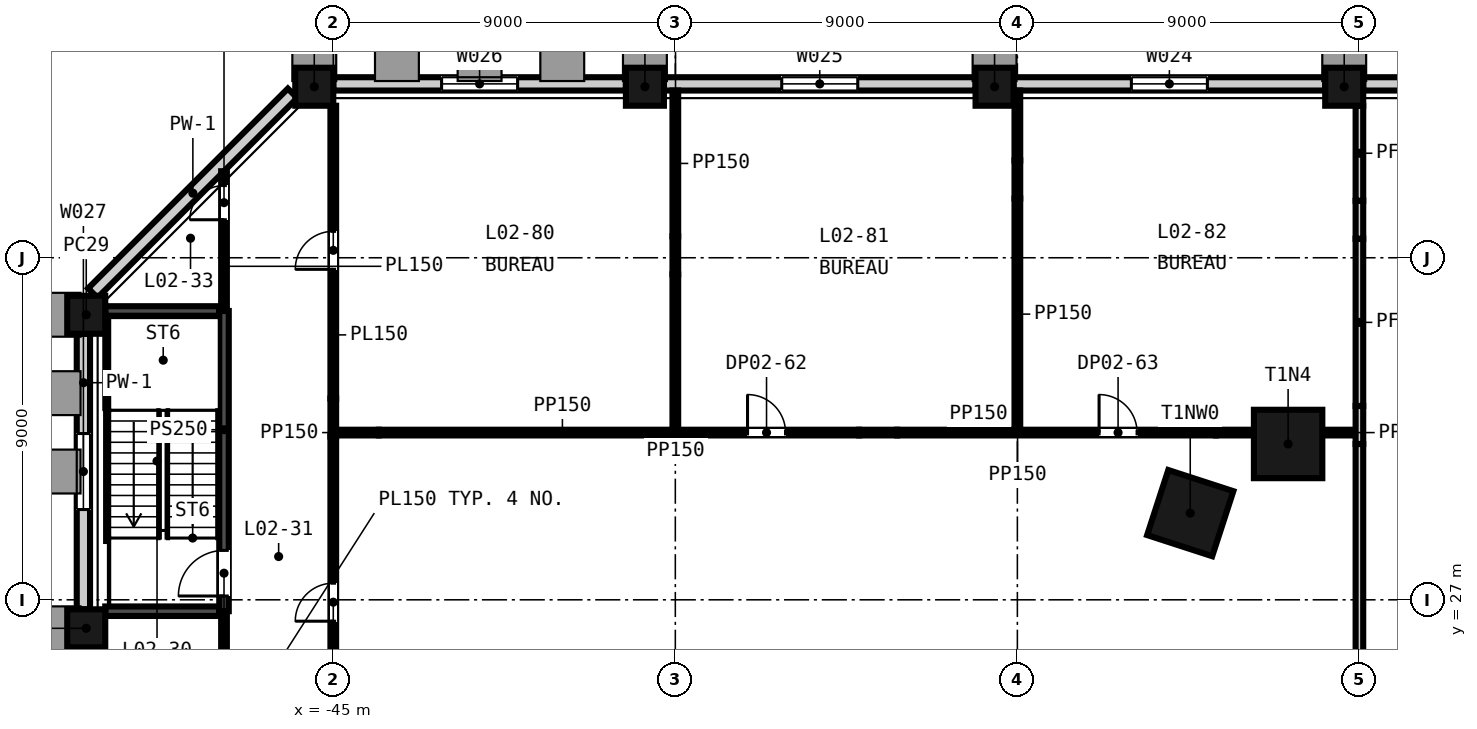
"""IFC4 building model, lengths in metres.
Left out: names, types, materials, properties, quantities, classifications, styles, units other than length and angle.
Written with IfcOpenShell. Run it as: python <this file> out.ifc"""

import sys

from ifc_helpers import new_model, si_unit, direction, frame, frame_2d, origin, origin_2d, place, context, subcontext, project, spatial, rectangle, extrude, element, fill, save


model = new_model("IFC4")
c1 = context("Model", 3, precision=1e-05, world=origin(), true_north=direction((0.0, 1.0)))
c2 = subcontext(c1, "Body", "Model", "MODEL_VIEW")
j1 = project(units=[si_unit("LENGTHUNIT", "METRE"), si_unit("PLANEANGLEUNIT", "RADIAN")], contexts=[c1])
p1 = place(None, origin())
s1 = spatial("IfcSite", under=j1, at=p1, CompositionType="ELEMENT")
p2 = place(p1, origin())
s2 = spatial("IfcBuilding", under=s1, at=p2, CompositionType="ELEMENT")
p3 = place(p2, frame((0.0, 0.0, 18.0)))
s3 = spatial("IfcBuildingStorey", under=s2, at=p3, CompositionType="ELEMENT", Elevation=18.0)
for number, where, z_axis, x_axis in (
    (1, (-19.876, 31.1, -0.4), (0.0, 0.0, 1.0), (-1.0, 0.0, 0.0)),
    (2, (-22.451, 29.281, -0.4), (0.0, 0.0, 1.0), (-0.309, -0.951, 0.0)),
):
    element("IfcColumn", number, at=place(p3, frame(where, z_axis=z_axis, x_axis=x_axis)), inside=s3, PredefinedType="COLUMN", context=c2, shape_type="SweptSolid", body=[
        extrude(rectangle(XDim=1.8, YDim=1.8, at=origin_2d()), origin(), (0.0, 0.0, 1.0), 4.6),
    ])
for number, where, z_axis, x_axis in (
    (3, (-18.4, 40.5, -0.4), (0.0, 0.0, 1.0), (-1.0, 0.0, 0.0)),
    (4, (-27.6, 40.5, -0.4), (0.0, 0.0, 1.0), (-1.0, 0.0, 0.0)),
    (5, (-36.8, 40.5, -0.4), (0.0, 0.0, 1.0), (-1.0, 0.0, 0.0)),
    (6, (-45.5, 40.5, -0.4), (0.0, 0.0, 1.0), (-1.0, 0.0, 0.0)),
    (7, (-51.5, 34.5, -0.4), (0.0, 0.0, 1.0), (0.0, -1.0, 0.0)),
    (8, (-51.5, 26.25, -0.4), (0.0, 0.0, 1.0), (0.0, -1.0, 0.0)),
):
    element("IfcColumn", number, at=place(p3, frame(where, z_axis=z_axis, x_axis=x_axis)), inside=s3, PredefinedType="COLUMN", context=c2, shape_type="SweptSolid", body=[
        extrude(rectangle(XDim=1.0, YDim=1.0, at=origin_2d()), origin(), (0.0, 0.0, 1.0), 4.6),
    ])
p4 = place(p3, frame((-9.7, 40.575, -0.4), z_axis=(0.0, 0.0, 1.0), x_axis=(-1.0, 0.0, 0.0)))
e9 = element("IfcWall", 9, at=p4, inside=s3, PredefinedType="SOLIDWALL", context=c2, shape_type="SweptSolid", body=[
    extrude(rectangle(XDim=8.2, YDim=0.35, at=frame_2d((4.1, 0.0))), origin(), (0.0, 0.0, 1.0), 3.7),
])
p5 = place(p4, frame((3.1, 0.0, 1.3)))
e10 = element("IfcOpeningElement", 10, at=p5, cuts=e9, PredefinedType="OPENING", context=c2, shape_type="SweptSolid", body=[
    extrude(rectangle(XDim=2.0, YDim=2.35, at=frame_2d((1.0, 1.175))), frame((0.0, 0.185, 0.0), z_axis=(0.0, -1.0, 0.0), x_axis=(1.0, 0.0, 0.0)), (0.0, 0.0, 1.0), 0.37),
])
p6 = place(p3, frame((-18.9, 40.575, -0.4), z_axis=(0.0, 0.0, 1.0), x_axis=(-1.0, 0.0, 0.0)))
e11 = element("IfcWall", 11, at=p6, inside=s3, PredefinedType="SOLIDWALL", context=c2, shape_type="SweptSolid", body=[
    extrude(rectangle(XDim=8.2, YDim=0.35, at=frame_2d((4.1, 0.0))), origin(), (0.0, 0.0, 1.0), 3.7),
])
p7 = place(p6, frame((3.1, 0.0, 1.3)))
e12 = element("IfcOpeningElement", 12, at=p7, cuts=e11, PredefinedType="OPENING", context=c2, shape_type="SweptSolid", body=[
    extrude(rectangle(XDim=2.0, YDim=2.35, at=frame_2d((1.0, 1.175))), frame((0.0, 0.185, 0.0), z_axis=(0.0, -1.0, 0.0), x_axis=(1.0, 0.0, 0.0)), (0.0, 0.0, 1.0), 0.37),
])
p8 = place(p3, frame((-28.1, 40.575, -0.4), z_axis=(0.0, 0.0, 1.0), x_axis=(-1.0, 0.0, 0.0)))
e13 = element("IfcWall", 13, at=p8, inside=s3, PredefinedType="SOLIDWALL", context=c2, shape_type="SweptSolid", body=[
    extrude(rectangle(XDim=8.2, YDim=0.35, at=frame_2d((4.1, 0.0))), origin(), (0.0, 0.0, 1.0), 3.7),
])
p9 = place(p8, frame((3.1, 0.0, 1.3)))
e14 = element("IfcOpeningElement", 14, at=p9, cuts=e13, PredefinedType="OPENING", context=c2, shape_type="SweptSolid", body=[
    extrude(rectangle(XDim=2.0, YDim=2.35, at=frame_2d((1.0, 1.175))), frame((0.0, 0.185, 0.0), z_axis=(0.0, -1.0, 0.0), x_axis=(1.0, 0.0, 0.0)), (0.0, 0.0, 1.0), 0.37),
])
p10 = place(p3, frame((-37.3, 40.575, -0.4), z_axis=(0.0, 0.0, 1.0), x_axis=(-1.0, 0.0, 0.0)))
e15 = element("IfcWall", 15, at=p10, inside=s3, PredefinedType="SOLIDWALL", context=c2, shape_type="SweptSolid", body=[
    extrude(rectangle(XDim=7.7, YDim=0.35, at=frame_2d((3.85, 0.0))), origin(), (0.0, 0.0, 1.0), 3.7),
])
p11 = place(p10, frame((2.85, 0.0, 1.3)))
e16 = element("IfcOpeningElement", 16, at=p11, cuts=e15, PredefinedType="OPENING", context=c2, shape_type="SweptSolid", body=[
    extrude(rectangle(XDim=2.0, YDim=2.35, at=frame_2d((1.0, 1.175))), frame((0.0, 0.185, 0.0), z_axis=(0.0, -1.0, 0.0), x_axis=(1.0, 0.0, 0.0)), (0.0, 0.0, 1.0), 0.37),
])
p12 = place(p3, frame((-46.072, 40.327, -0.4), z_axis=(0.0, 0.0, 1.0), x_axis=(-0.707106781187, -0.707106781187, 0.0)))
e17 = element("IfcWall", 17, at=p12, inside=s3, PredefinedType="SOLIDWALL", context=c2, shape_type="SweptSolid", body=[
    extrude(rectangle(XDim=7.433, YDim=0.35, at=frame_2d((3.716, 0.0))), origin(), (0.0, 0.0, 1.0), 3.7),
])
p13 = place(p3, frame((-51.575, 34.0, -0.4), z_axis=(0.0, 0.0, 1.0), x_axis=(0.0, -1.0, 0.0)))
e18 = element("IfcWall", 18, at=p13, inside=s3, PredefinedType="SOLIDWALL", context=c2, shape_type="SweptSolid", body=[
    extrude(rectangle(XDim=7.25, YDim=0.35, at=frame_2d((3.625, 0.0))), origin(), (0.0, 0.0, 1.0), 3.7),
])
p14 = place(p13, frame((2.625, 0.0, 1.3)))
e19 = element("IfcOpeningElement", 19, at=p14, cuts=e18, PredefinedType="OPENING", context=c2, shape_type="SweptSolid", body=[
    extrude(rectangle(XDim=2.0, YDim=2.35, at=frame_2d((1.0, 1.175))), frame((0.0, 0.185, 0.0), z_axis=(0.0, -1.0, 0.0), x_axis=(1.0, 0.0, 0.0)), (0.0, 0.0, 1.0), 0.37),
])
p15 = place(p3, frame((-51.575, 25.75, -0.4), z_axis=(0.0, 0.0, 1.0), x_axis=(0.0, -1.0, 0.0)))
e20 = element("IfcWall", 20, at=p15, inside=s3, PredefinedType="SOLIDWALL", context=c2, shape_type="SweptSolid", body=[
    extrude(rectangle(XDim=7.75, YDim=0.35, at=frame_2d((3.875, 0.0))), origin(), (0.0, 0.0, 1.0), 3.7),
])
p16 = place(p15, frame((2.875, 0.0, 1.3)))
e21 = element("IfcOpeningElement", 21, at=p16, cuts=e20, PredefinedType="OPENING", context=c2, shape_type="SweptSolid", body=[
    extrude(rectangle(XDim=2.0, YDim=2.35, at=frame_2d((1.0, 1.175))), frame((0.0, 0.185, 0.0), z_axis=(0.0, -1.0, 0.0), x_axis=(1.0, 0.0, 0.0)), (0.0, 0.0, 1.0), 0.37),
])
p17 = place(p3, frame((-51.0, 26.7, 0.0), z_axis=(0.0, 0.0, 1.0), x_axis=(1.0, 0.0, 0.0)))
e22 = element("IfcWall", 22, at=p17, inside=s3, PredefinedType="SHEAR", context=c2, shape_type="SweptSolid", body=[
    extrude(rectangle(XDim=3.0, YDim=0.25, at=frame_2d((1.5, 0.0))), origin(), (0.0, 0.0, 1.0), 4.2),
])
p18 = place(p3, frame((-44.925, 31.4, 0.0), z_axis=(0.0, 0.0, 1.0), x_axis=(1.0, 0.0, 0.0)))
e23 = element("IfcWall", 23, at=p18, inside=s3, PredefinedType="PARTITIONING", context=c2, shape_type="SweptSolid", body=[
    extrude(rectangle(XDim=1.123, YDim=0.15, at=frame_2d((0.562, 0.0))), origin(), (0.0, 0.0, 1.0), 3.111),
])
p19 = place(p3, frame((-43.802, 31.4, 0.0), z_axis=(0.0, 0.0, 1.0), x_axis=(1.0, 0.0, 0.0)))
e24 = element("IfcWall", 24, at=p19, inside=s3, PredefinedType="PARTITIONING", context=c2, shape_type="SweptSolid", body=[
    extrude(rectangle(XDim=12.64, YDim=0.15, at=frame_2d((6.32, 0.0))), origin(), (0.0, 0.0, 1.0), 4.2),
])
p20 = place(p19, frame((9.702, 0.0, 0.0)))
e25 = element("IfcOpeningElement", 25, at=p20, cuts=e24, PredefinedType="OPENING", context=c2, shape_type="SweptSolid", body=[
    extrude(rectangle(XDim=1.0, YDim=2.1, at=frame_2d((0.5, 1.05))), frame((0.0, 0.085, 0.0), z_axis=(0.0, -1.0, 0.0), x_axis=(1.0, 0.0, 0.0)), (0.0, 0.0, 1.0), 0.17),
])
p21 = place(p3, frame((-31.162, 31.4, 0.0), z_axis=(0.0, 0.0, 1.0), x_axis=(1.0, 0.0, 0.0)))
e26 = element("IfcWall", 26, at=p21, inside=s3, PredefinedType="PARTITIONING", context=c2, shape_type="SweptSolid", body=[
    extrude(rectangle(XDim=1.0, YDim=0.15, at=frame_2d((0.5, 0.0))), origin(), (0.0, 0.0, 1.0), 3.219),
])
p22 = place(p3, frame((-30.162, 31.4, 0.0), z_axis=(0.0, 0.0, 1.0), x_axis=(1.0, 0.0, 0.0)))
e27 = element("IfcWall", 27, at=p22, inside=s3, PredefinedType="PARTITIONING", context=c2, shape_type="SweptSolid", body=[
    extrude(rectangle(XDim=8.386, YDim=0.15, at=frame_2d((4.193, 0.0))), origin(), (0.0, 0.0, 1.0), 4.2),
])
p23 = place(p22, frame((5.312, 0.0, 0.0)))
e28 = element("IfcOpeningElement", 28, at=p23, cuts=e27, PredefinedType="OPENING", context=c2, shape_type="SweptSolid", body=[
    extrude(rectangle(XDim=1.0, YDim=2.1, at=frame_2d((0.5, 1.05))), frame((0.0, 0.085, 0.0), z_axis=(0.0, -1.0, 0.0), x_axis=(1.0, 0.0, 0.0)), (0.0, 0.0, 1.0), 0.17),
])
p24 = place(p3, frame((-21.776, 31.4, 0.0), z_axis=(0.0, 0.0, 1.0), x_axis=(1.0, 0.0, 0.0)))
e29 = element("IfcWall", 29, at=p24, inside=s3, PredefinedType="PARTITIONING", context=c2, shape_type="SweptSolid", body=[
    extrude(rectangle(XDim=1.0, YDim=0.15, at=frame_2d((0.5, 0.0))), origin(), (0.0, 0.0, 1.0), 3.2),
])
p25 = place(p3, frame((-18.976, 31.4, 0.0), z_axis=(0.0, 0.0, 1.0), x_axis=(1.0, 0.0, 0.0)))
e30 = element("IfcWall", 30, at=p25, inside=s3, PredefinedType="PARTITIONING", context=c2, shape_type="SweptSolid", body=[
    extrude(rectangle(XDim=0.876, YDim=0.15, at=frame_2d((0.438, 0.0))), origin(), (0.0, 0.0, 1.0), 3.2),
])
p26 = place(p3, frame((-51.0, 34.6, 0.0), z_axis=(0.0, 0.0, 1.0), x_axis=(1.0, 0.0, 0.0)))
e31 = element("IfcWall", 31, at=p26, inside=s3, PredefinedType="SHEAR", context=c2, shape_type="SweptSolid", body=[
    extrude(rectangle(XDim=3.0, YDim=0.25, at=frame_2d((1.5, 0.0))), origin(), (0.0, 0.0, 1.0), 4.2),
])
p27 = place(p3, frame((-47.875, 23.616, 0.0), z_axis=(0.0, 0.0, 1.0), x_axis=(0.0, 1.0, 0.0)))
e32 = element("IfcWall", 32, at=p27, inside=s3, PredefinedType="PARTITIONING", context=c2, shape_type="SweptSolid", body=[
    extrude(rectangle(XDim=3.084, YDim=0.15, at=frame_2d((1.542, 0.0))), origin(), (0.0, 0.0, 1.0), 4.2),
])
p28 = place(p3, frame((-47.875, 26.7, 0.0), z_axis=(0.0, 0.0, 1.0), x_axis=(0.0, 1.0, 0.0)))
e33 = element("IfcWall", 33, at=p28, inside=s3, PredefinedType="SHEAR", context=c2, shape_type="SweptSolid", body=[
    extrude(rectangle(XDim=7.9, YDim=0.25, at=frame_2d((3.95, 0.0))), origin(), (0.0, 0.0, 1.0), 4.2),
])
p29 = place(p28, frame((0.4, 0.0, 0.0)))
e34 = element("IfcOpeningElement", 34, at=p29, cuts=e33, PredefinedType="OPENING", context=c2, shape_type="SweptSolid", body=[
    extrude(rectangle(XDim=1.2, YDim=2.1, at=frame_2d((0.6, 1.05))), frame((0.0, 0.135, 0.0), z_axis=(0.0, -1.0, 0.0), x_axis=(1.0, 0.0, 0.0)), (0.0, 0.0, 1.0), 0.27),
])
p30 = place(p3, frame((-47.875, 34.6, 0.0), z_axis=(0.0, 0.0, 1.0), x_axis=(0.0, 1.0, 0.0)))
e35 = element("IfcWall", 35, at=p30, inside=s3, PredefinedType="PARTITIONING", context=c2, shape_type="SweptSolid", body=[
    extrude(rectangle(XDim=3.677, YDim=0.15, at=frame_2d((1.838, 0.0))), origin(), (0.0, 0.0, 1.0), 3.667),
])
p31 = place(p30, frame((2.4, 0.0, 0.0)))
e36 = element("IfcOpeningElement", 36, at=p31, cuts=e35, PredefinedType="OPENING", context=c2, shape_type="SweptSolid", body=[
    extrude(rectangle(XDim=0.9, YDim=2.1, at=frame_2d((0.45, 1.05))), frame((0.0, 0.085, 0.0), z_axis=(0.0, -1.0, 0.0), x_axis=(1.0, 0.0, 0.0)), (0.0, 0.0, 1.0), 0.17),
])
p32 = place(p3, frame((-45.0, 22.537, 0.0), z_axis=(0.0, 0.0, 1.0), x_axis=(0.0, 1.0, 0.0)))
e37 = element("IfcWall", 37, at=p32, inside=s3, PredefinedType="PARTITIONING", context=c2, shape_type="SweptSolid", body=[
    extrude(rectangle(XDim=8.758, YDim=0.15, at=frame_2d((4.379, 0.0))), origin(), (0.0, 0.0, 1.0), 4.2),
])
p33 = place(p32, frame((3.9, 0.0, 0.0)))
e38 = element("IfcOpeningElement", 38, at=p33, cuts=e37, PredefinedType="OPENING", context=c2, shape_type="SweptSolid", body=[
    extrude(rectangle(XDim=1.0, YDim=2.1, at=frame_2d((0.5, 1.05))), frame((0.0, 0.085, 0.0), z_axis=(0.0, -1.0, 0.0), x_axis=(1.0, 0.0, 0.0)), (0.0, 0.0, 1.0), 0.17),
])
p34 = place(p3, frame((-45.0, 31.295, 0.0), z_axis=(0.0, 0.0, 1.0), x_axis=(0.0, 1.0, 0.0)))
e39 = element("IfcWall", 39, at=p34, inside=s3, PredefinedType="PARTITIONING", context=c2, shape_type="SweptSolid", body=[
    extrude(rectangle(XDim=1.0, YDim=0.15, at=frame_2d((0.5, 0.0))), origin(), (0.0, 0.0, 1.0), 3.111),
])
p35 = place(p3, frame((-45.0, 32.295, 0.0), z_axis=(0.0, 0.0, 1.0), x_axis=(0.0, 1.0, 0.0)))
e40 = element("IfcWall", 40, at=p35, inside=s3, PredefinedType="PARTITIONING", context=c2, shape_type="SweptSolid", body=[
    extrude(rectangle(XDim=7.705, YDim=0.15, at=frame_2d((3.852, 0.0))), origin(), (0.0, 0.0, 1.0), 4.2),
])
p36 = place(p35, frame((3.4, 0.0, 0.0)))
e41 = element("IfcOpeningElement", 41, at=p36, cuts=e40, PredefinedType="OPENING", context=c2, shape_type="SweptSolid", body=[
    extrude(rectangle(XDim=1.0, YDim=2.1, at=frame_2d((0.5, 1.05))), frame((0.0, 0.085, 0.0), z_axis=(0.0, -1.0, 0.0), x_axis=(1.0, 0.0, 0.0)), (0.0, 0.0, 1.0), 0.17),
])
p37 = place(p3, frame((-36.0, 31.475, 0.0), z_axis=(0.0, 0.0, 1.0), x_axis=(0.0, 1.0, 0.0)))
e42 = element("IfcWall", 42, at=p37, inside=s3, PredefinedType="PARTITIONING", context=c2, shape_type="SweptSolid", body=[
    extrude(rectangle(XDim=4.089, YDim=0.15, at=frame_2d((2.044, 0.0))), origin(), (0.0, 0.0, 1.0), 4.2),
])
p38 = place(p3, frame((-36.0, 35.564, 0.0), z_axis=(0.0, 0.0, 1.0), x_axis=(0.0, 1.0, 0.0)))
e43 = element("IfcWall", 43, at=p38, inside=s3, PredefinedType="PARTITIONING", context=c2, shape_type="SweptSolid", body=[
    extrude(rectangle(XDim=1.0, YDim=0.15, at=frame_2d((0.5, 0.0))), origin(), (0.0, 0.0, 1.0), 3.219),
])
p39 = place(p3, frame((-36.0, 36.564, 0.0), z_axis=(0.0, 0.0, 1.0), x_axis=(0.0, 1.0, 0.0)))
e44 = element("IfcWall", 44, at=p39, inside=s3, PredefinedType="PARTITIONING", context=c2, shape_type="SweptSolid", body=[
    extrude(rectangle(XDim=3.836, YDim=0.15, at=frame_2d((1.918, 0.0))), origin(), (0.0, 0.0, 1.0), 4.2),
])
p40 = place(p3, frame((-27.0, 31.475, 0.0), z_axis=(0.0, 0.0, 1.0), x_axis=(0.0, 1.0, 0.0)))
e45 = element("IfcWall", 45, at=p40, inside=s3, PredefinedType="PARTITIONING", context=c2, shape_type="SweptSolid", body=[
    extrude(rectangle(XDim=6.083, YDim=0.15, at=frame_2d((3.042, 0.0))), origin(), (0.0, 0.0, 1.0), 4.2),
])
p41 = place(p3, frame((-27.0, 37.559, 0.0), z_axis=(0.0, 0.0, 1.0), x_axis=(0.0, 1.0, 0.0)))
e46 = element("IfcWall", 46, at=p41, inside=s3, PredefinedType="PARTITIONING", context=c2, shape_type="SweptSolid", body=[
    extrude(rectangle(XDim=1.0, YDim=0.15, at=frame_2d((0.5, 0.0))), origin(), (0.0, 0.0, 1.0), 3.521),
])
p42 = place(p3, frame((-27.0, 38.559, 0.0), z_axis=(0.0, 0.0, 1.0), x_axis=(0.0, 1.0, 0.0)))
e47 = element("IfcWall", 47, at=p42, inside=s3, PredefinedType="PARTITIONING", context=c2, shape_type="SweptSolid", body=[
    extrude(rectangle(XDim=1.841, YDim=0.15, at=frame_2d((0.921, 0.0))), origin(), (0.0, 0.0, 1.0), 4.2),
])
p43 = place(p3, frame((-18.0, 18.0, 0.0), z_axis=(0.0, 0.0, 1.0), x_axis=(0.0, 1.0, 0.0)))
e48 = element("IfcWall", 48, at=p43, inside=s3, PredefinedType="PARTITIONING", context=c2, shape_type="SweptSolid", body=[
    extrude(rectangle(XDim=13.1, YDim=0.2, at=frame_2d((6.55, 0.0))), origin(), (0.0, 0.0, 1.0), 4.2),
])
p44 = place(p3, frame((-18.0, 31.1, 0.0), z_axis=(0.0, 0.0, 1.0), x_axis=(0.0, 1.0, 0.0)))
e49 = element("IfcWall", 49, at=p44, inside=s3, PredefinedType="PARTITIONING", context=c2, shape_type="SweptSolid", body=[
    extrude(rectangle(XDim=1.0, YDim=0.2, at=frame_2d((0.5, 0.0))), origin(), (0.0, 0.0, 1.0), 3.2),
])
p45 = place(p3, frame((-18.0, 32.1, 0.0), z_axis=(0.0, 0.0, 1.0), x_axis=(0.0, 1.0, 0.0)))
e50 = element("IfcWall", 50, at=p45, inside=s3, PredefinedType="PARTITIONING", context=c2, shape_type="SweptSolid", body=[
    extrude(rectangle(XDim=4.4, YDim=0.2, at=frame_2d((2.2, 0.0))), origin(), (0.0, 0.0, 1.0), 4.2),
])
p46 = place(p3, frame((-18.0, 36.5, 0.0), z_axis=(0.0, 0.0, 1.0), x_axis=(0.0, 1.0, 0.0)))
e51 = element("IfcWall", 51, at=p46, inside=s3, PredefinedType="PARTITIONING", context=c2, shape_type="SweptSolid", body=[
    extrude(rectangle(XDim=1.0, YDim=0.2, at=frame_2d((0.5, 0.0))), origin(), (0.0, 0.0, 1.0), 3.597),
])
p47 = place(p3, frame((-18.0, 37.5, 0.0), z_axis=(0.0, 0.0, 1.0), x_axis=(0.0, 1.0, 0.0)))
e52 = element("IfcWall", 52, at=p47, inside=s3, PredefinedType="PARTITIONING", context=c2, shape_type="SweptSolid", body=[
    extrude(rectangle(XDim=2.5, YDim=0.2, at=frame_2d((1.25, 0.0))), origin(), (0.0, 0.0, 1.0), 4.2),
])
p48 = place(p7, origin())
e53 = element("IfcWindow", 53, at=p48, inside=s3, PartitioningType="SINGLE_PANEL", PredefinedType="WINDOW", context=c2, shape_type="SweptSolid", body=[
    extrude(rectangle(XDim=2.0, YDim=2.35, at=frame_2d((1.0, 1.175))), frame((0.0, 0.03, 0.0), z_axis=(0.0, -1.0, 0.0), x_axis=(1.0, 0.0, 0.0)), (0.0, 0.0, 1.0), 0.06),
])
fill(e12, e53)
p49 = place(p9, origin())
e54 = element("IfcWindow", 54, at=p49, inside=s3, PartitioningType="SINGLE_PANEL", PredefinedType="WINDOW", context=c2, shape_type="SweptSolid", body=[
    extrude(rectangle(XDim=2.0, YDim=2.35, at=frame_2d((1.0, 1.175))), frame((0.0, 0.03, 0.0), z_axis=(0.0, -1.0, 0.0), x_axis=(1.0, 0.0, 0.0)), (0.0, 0.0, 1.0), 0.06),
])
fill(e14, e54)
p50 = place(p11, origin())
e55 = element("IfcWindow", 55, at=p50, inside=s3, PartitioningType="SINGLE_PANEL", PredefinedType="WINDOW", context=c2, shape_type="SweptSolid", body=[
    extrude(rectangle(XDim=2.0, YDim=2.35, at=frame_2d((1.0, 1.175))), frame((0.0, 0.03, 0.0), z_axis=(0.0, -1.0, 0.0), x_axis=(1.0, 0.0, 0.0)), (0.0, 0.0, 1.0), 0.06),
])
fill(e16, e55)
p51 = place(p14, origin())
e56 = element("IfcWindow", 56, at=p51, inside=s3, PartitioningType="SINGLE_PANEL", PredefinedType="WINDOW", context=c2, shape_type="SweptSolid", body=[
    extrude(rectangle(XDim=2.0, YDim=2.35, at=frame_2d((1.0, 1.175))), frame((0.0, 0.03, 0.0), z_axis=(0.0, -1.0, 0.0), x_axis=(1.0, 0.0, 0.0)), (0.0, 0.0, 1.0), 0.06),
])
fill(e19, e56)
p52 = place(p29, origin())
e57 = element("IfcDoor", 57, at=p52, inside=s3, OperationType="SINGLE_SWING_LEFT", PredefinedType="DOOR", context=c2, shape_type="SweptSolid", body=[
    extrude(rectangle(XDim=1.2, YDim=2.1, at=frame_2d((0.6, 1.05))), frame((0.0, 0.025, 0.0), z_axis=(0.0, -1.0, 0.0), x_axis=(1.0, 0.0, 0.0)), (0.0, 0.0, 1.0), 0.05),
])
fill(e34, e57)
p53 = place(p31, origin())
e58 = element("IfcDoor", 58, at=p53, inside=s3, OperationType="SINGLE_SWING_LEFT", PredefinedType="DOOR", context=c2, shape_type="SweptSolid", body=[
    extrude(rectangle(XDim=0.9, YDim=2.1, at=frame_2d((0.45, 1.05))), frame((0.0, 0.025, 0.0), z_axis=(0.0, -1.0, 0.0), x_axis=(1.0, 0.0, 0.0)), (0.0, 0.0, 1.0), 0.05),
])
fill(e36, e58)
p54 = place(p33, origin())
e59 = element("IfcDoor", 59, at=p54, inside=s3, OperationType="SINGLE_SWING_LEFT", PredefinedType="DOOR", context=c2, shape_type="SweptSolid", body=[
    extrude(rectangle(XDim=1.0, YDim=2.1, at=frame_2d((0.5, 1.05))), frame((0.0, 0.025, 0.0), z_axis=(0.0, -1.0, 0.0), x_axis=(1.0, 0.0, 0.0)), (0.0, 0.0, 1.0), 0.05),
])
fill(e38, e59)
p55 = place(p36, origin())
e60 = element("IfcDoor", 60, at=p55, inside=s3, OperationType="SINGLE_SWING_LEFT", PredefinedType="DOOR", context=c2, shape_type="SweptSolid", body=[
    extrude(rectangle(XDim=1.0, YDim=2.1, at=frame_2d((0.5, 1.05))), frame((0.0, 0.025, 0.0), z_axis=(0.0, -1.0, 0.0), x_axis=(1.0, 0.0, 0.0)), (0.0, 0.0, 1.0), 0.05),
])
fill(e41, e60)
p56 = place(p20, origin())
e61 = element("IfcDoor", 61, at=p56, inside=s3, OperationType="SINGLE_SWING_LEFT", PredefinedType="DOOR", context=c2, shape_type="SweptSolid", body=[
    extrude(rectangle(XDim=1.0, YDim=2.1, at=frame_2d((0.5, 1.05))), frame((0.0, 0.025, 0.0), z_axis=(0.0, -1.0, 0.0), x_axis=(1.0, 0.0, 0.0)), (0.0, 0.0, 1.0), 0.05),
])
fill(e25, e61)
p57 = place(p23, origin())
e62 = element("IfcDoor", 62, at=p57, inside=s3, OperationType="SINGLE_SWING_LEFT", PredefinedType="DOOR", context=c2, shape_type="SweptSolid", body=[
    extrude(rectangle(XDim=1.0, YDim=2.1, at=frame_2d((0.5, 1.05))), frame((0.0, 0.025, 0.0), z_axis=(0.0, -1.0, 0.0), x_axis=(1.0, 0.0, 0.0)), (0.0, 0.0, 1.0), 0.05),
])
fill(e28, e62)
save(model, sys.argv[1])
